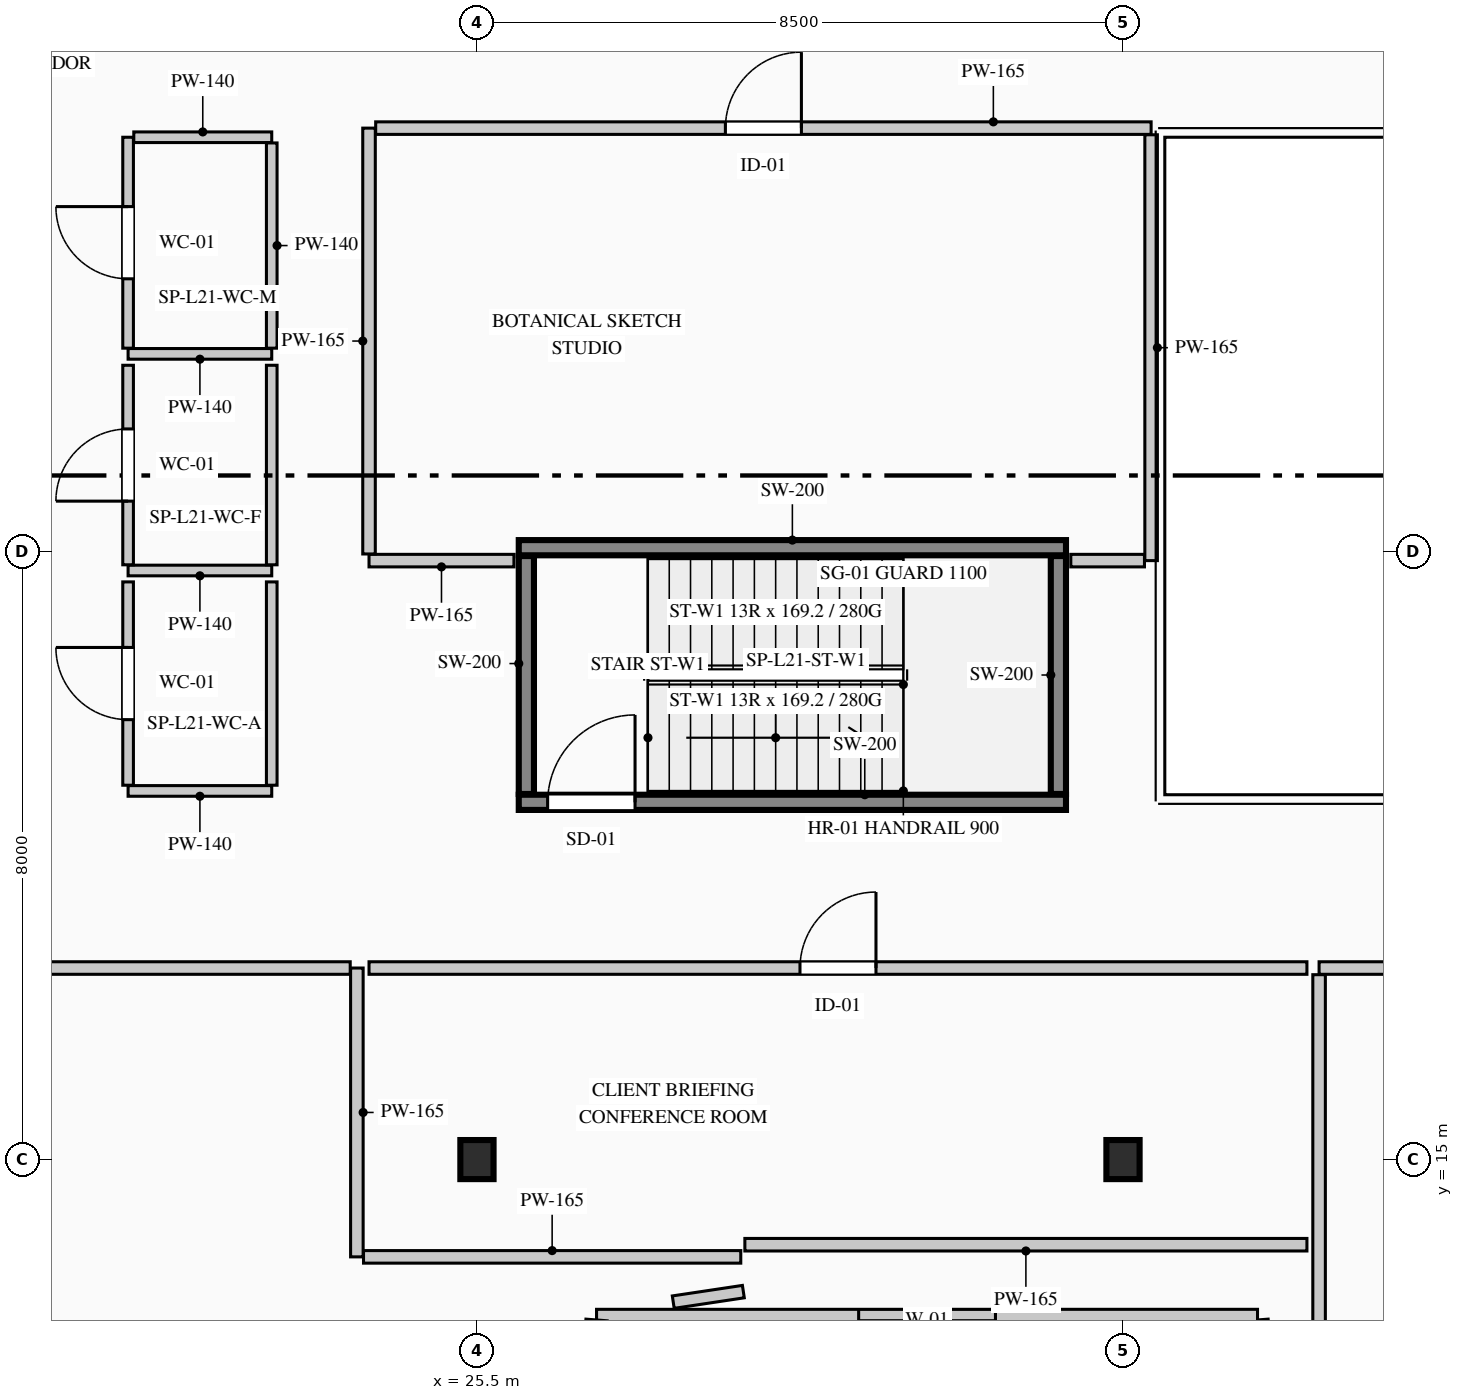
"""IFC4 building model, lengths in metres.
Left out: names, types, materials, properties, quantities, classifications, styles, units other than length and angle.
Written with IfcOpenShell. Run it as: python <this file> out.ifc"""

import sys

from ifc_helpers import new_model, si_unit, direction, frame, frame_2d, origin, origin_2d, place, context, subcontext, project, spatial, rectangle, i_section, extrude, element, fill, save


model = new_model("IFC4")
c1 = context("Model", 3, precision=1e-05, world=origin(), true_north=direction((0.0, 1.0)))
c2 = subcontext(c1, "Body", "Model", "MODEL_VIEW")
j1 = project(units=[si_unit("LENGTHUNIT", "METRE"), si_unit("PLANEANGLEUNIT", "RADIAN")], contexts=[c1])
p1 = place(None, origin())
s1 = spatial("IfcSite", under=j1, at=p1, CompositionType="ELEMENT")
p2 = place(p1, origin())
s2 = spatial("IfcBuilding", under=s1, at=p2, CompositionType="ELEMENT")
p3 = place(p2, frame((0.0, 0.0, 93.0)))
s3 = spatial("IfcBuildingStorey", under=s2, at=p3, CompositionType="ELEMENT", Elevation=93.0)
p4 = place(p3, frame((26.05, 19.7, 0.0), z_axis=(0.0, 0.0, 1.0), x_axis=(1.0, 0.0, 0.0)))
e1 = element("IfcWall", 1, at=p4, inside=s3, PredefinedType="SHEAR", context=c2, shape_type="SweptSolid", body=[
    extrude(rectangle(XDim=7.2, YDim=0.2, at=frame_2d((3.6, 0.0))), origin(), (0.0, 0.0, 1.0), 4.4),
])
p5 = place(p4, frame((0.38, 0.0, 0.0)))
e2 = element("IfcOpeningElement", 2, at=p5, cuts=e1, PredefinedType="OPENING", context=c2, shape_type="SweptSolid", body=[
    extrude(rectangle(XDim=1.15, YDim=2.2, at=frame_2d((0.575, 1.1))), frame((0.0, 0.11, 0.0), z_axis=(0.0, -1.0, 0.0), x_axis=(1.0, 0.0, 0.0)), (0.0, 0.0, 1.0), 0.22),
])
p6 = place(p3, frame((26.05, 23.05, 0.0), z_axis=(0.0, 0.0, 1.0), x_axis=(1.0, 0.0, 0.0)))
e3 = element("IfcWall", 3, at=p6, inside=s3, PredefinedType="SHEAR", context=c2, shape_type="SweptSolid", body=[
    extrude(rectangle(XDim=7.2, YDim=0.2, at=frame_2d((3.6, 0.0))), origin(), (0.0, 0.0, 1.0), 4.4),
])
for number, where, z_axis, x_axis in (
    (4, (26.15, 19.81, 0.0), (0.0, 0.0, 1.0), (0.0, 1.0, 0.0)),
    (5, (33.15, 19.81, 0.0), (0.0, 0.0, 1.0), (0.0, 1.0, 0.0)),
):
    element("IfcWall", number, at=place(p3, frame(where, z_axis=z_axis, x_axis=x_axis)), inside=s3, PredefinedType="SHEAR", context=c2, shape_type="SweptSolid", body=[
        extrude(rectangle(XDim=3.13, YDim=0.2, at=frame_2d((1.565, 0.0))), origin(), (0.0, 0.0, 1.0), 4.4),
    ])
for number, where, z_axis, x_axis in (
    (6, (25.5, 15.0, 0.0), (0.0, 0.0, 1.0), (1.0, 0.0, 0.0)),
    (7, (34.0, 15.0, 0.0), (0.0, 0.0, 1.0), (1.0, 0.0, 0.0)),
):
    element("IfcColumn", number, at=place(p3, frame(where, z_axis=z_axis, x_axis=x_axis)), inside=s3, PredefinedType="COLUMN", context=c2, shape_type="SweptSolid", body=[
        extrude(i_section(OverallWidth=0.437, OverallDepth=0.514, WebThickness=0.061, FlangeThickness=0.077, FilletRadius=0.015, at=origin_2d()), origin(), (0.0, 0.0, 1.0), 4.4),
    ])
p7 = place(p3, frame((36.57, 2.64, 0.0), z_axis=(0.0, 0.0, 1.0), x_axis=(-0.077816860153, 0.996967670627, 0.0)))
e8 = element("IfcWall", 8, at=p7, inside=s3, PredefinedType="STANDARD", context=c2, shape_type="SweptSolid", body=[
    extrude(rectangle(XDim=10.281, YDim=0.28, at=frame_2d((5.141, 0.0))), origin(), (0.0, 0.0, 1.0), 4.115),
])
p8 = place(p7, frame((5.68, 0.0, 0.9)))
e9 = element("IfcOpeningElement", 9, at=p8, cuts=e8, PredefinedType="OPENING", context=c2, shape_type="SweptSolid", body=[
    extrude(rectangle(XDim=1.8, YDim=2.1, at=frame_2d((0.9, 1.05))), frame((0.0, 0.15, 0.0), z_axis=(0.0, -1.0, 0.0), x_axis=(1.0, 0.0, 0.0)), (0.0, 0.0, 1.0), 0.3),
])
p9 = place(p3, frame((35.77, 12.89, 0.0), z_axis=(0.0, 0.0, 1.0), x_axis=(-1.0, 0.0, 0.0)))
e10 = element("IfcWall", 10, at=p9, inside=s3, PredefinedType="STANDARD", context=c2, shape_type="SweptSolid", body=[
    extrude(rectangle(XDim=8.697, YDim=0.28, at=frame_2d((4.348, 0.0))), origin(), (0.0, 0.0, 1.0), 4.115),
])
p10 = place(p9, frame((3.448, 0.0, 0.9)))
e11 = element("IfcOpeningElement", 11, at=p10, cuts=e10, PredefinedType="OPENING", context=c2, shape_type="SweptSolid", body=[
    extrude(rectangle(XDim=1.8, YDim=2.1, at=frame_2d((0.9, 1.05))), frame((0.0, 0.15, 0.0), z_axis=(0.0, -1.0, 0.0), x_axis=(1.0, 0.0, 0.0)), (0.0, 0.0, 1.0), 0.3),
])
p11 = place(p3, frame((27.073, 12.89, 0.0), z_axis=(0.0, 0.0, 1.0), x_axis=(-0.077816860153, -0.996967670627, 0.0)))
e12 = element("IfcWall", 12, at=p11, inside=s3, PredefinedType="STANDARD", context=c2, shape_type="SweptSolid", body=[
    extrude(rectangle(XDim=10.281, YDim=0.28, at=frame_2d((5.141, 0.0))), origin(), (0.0, 0.0, 1.0), 4.115),
])
p12 = place(p11, frame((2.801, 0.0, 0.9)))
e13 = element("IfcOpeningElement", 13, at=p12, cuts=e12, PredefinedType="OPENING", context=c2, shape_type="SweptSolid", body=[
    extrude(rectangle(XDim=1.8, YDim=2.1, at=frame_2d((0.9, 1.05))), frame((0.0, 0.15, 0.0), z_axis=(0.0, -1.0, 0.0), x_axis=(1.0, 0.0, 0.0)), (0.0, 0.0, 1.0), 0.3),
])
p13 = place(p3, frame((22.8, 25.6, 0.0), z_axis=(0.0, 0.0, 1.0), x_axis=(-1.0, 0.0, 0.0)))
e14 = element("IfcWall", 14, at=p13, inside=s3, PredefinedType="PARTITIONING", context=c2, shape_type="SweptSolid", body=[
    extrude(rectangle(XDim=1.89, YDim=0.14, at=frame_2d((0.945, 0.0))), origin(), (0.0, 0.0, 1.0), 4.115),
])
p14 = place(p3, frame((20.91, 25.675, 0.0), z_axis=(0.0, 0.0, 1.0), x_axis=(0.0, 1.0, 0.0)))
e15 = element("IfcWall", 15, at=p14, inside=s3, PredefinedType="PARTITIONING", context=c2, shape_type="SweptSolid", body=[
    extrude(rectangle(XDim=2.775, YDim=0.14, at=frame_2d((1.387, 0.0))), origin(), (0.0, 0.0, 1.0), 4.115),
])
p15 = place(p14, frame((0.913, 0.0, 0.0)))
e16 = element("IfcOpeningElement", 16, at=p15, cuts=e15, PredefinedType="OPENING", context=c2, shape_type="SweptSolid", body=[
    extrude(rectangle(XDim=0.95, YDim=2.15, at=frame_2d((0.475, 1.075))), frame((0.0, 0.08, 0.0), z_axis=(0.0, -1.0, 0.0), x_axis=(1.0, 0.0, 0.0)), (0.0, 0.0, 1.0), 0.16),
])
p16 = place(p3, frame((20.985, 28.45, 0.0), z_axis=(0.0, 0.0, 1.0), x_axis=(1.0, 0.0, 0.0)))
e17 = element("IfcWall", 17, at=p16, inside=s3, PredefinedType="PARTITIONING", context=c2, shape_type="SweptSolid", body=[
    extrude(rectangle(XDim=1.815, YDim=0.14, at=frame_2d((0.907, 0.0))), origin(), (0.0, 0.0, 1.0), 4.115),
])
p17 = place(p3, frame((22.8, 28.375, 0.0), z_axis=(0.0, 0.0, 1.0), x_axis=(0.0, -1.0, 0.0)))
e18 = element("IfcWall", 18, at=p17, inside=s3, PredefinedType="PARTITIONING", context=c2, shape_type="SweptSolid", body=[
    extrude(rectangle(XDim=2.7, YDim=0.14, at=frame_2d((1.35, 0.0))), origin(), (0.0, 0.0, 1.0), 3.7),
])
p18 = place(p3, frame((22.8, 22.75, 0.0), z_axis=(0.0, 0.0, 1.0), x_axis=(-1.0, 0.0, 0.0)))
e19 = element("IfcWall", 19, at=p18, inside=s3, PredefinedType="PARTITIONING", context=c2, shape_type="SweptSolid", body=[
    extrude(rectangle(XDim=1.89, YDim=0.14, at=frame_2d((0.945, 0.0))), origin(), (0.0, 0.0, 1.0), 4.115),
])
p19 = place(p3, frame((20.91, 22.825, 0.0), z_axis=(0.0, 0.0, 1.0), x_axis=(0.0, 1.0, 0.0)))
e20 = element("IfcWall", 20, at=p19, inside=s3, PredefinedType="PARTITIONING", context=c2, shape_type="SweptSolid", body=[
    extrude(rectangle(XDim=2.625, YDim=0.14, at=frame_2d((1.312, 0.0))), origin(), (0.0, 0.0, 1.0), 4.115),
])
p20 = place(p19, frame((0.837, 0.0, 0.0)))
e21 = element("IfcOpeningElement", 21, at=p20, cuts=e20, PredefinedType="OPENING", context=c2, shape_type="SweptSolid", body=[
    extrude(rectangle(XDim=0.95, YDim=2.15, at=frame_2d((0.475, 1.075))), frame((0.0, 0.08, 0.0), z_axis=(0.0, -1.0, 0.0), x_axis=(1.0, 0.0, 0.0)), (0.0, 0.0, 1.0), 0.16),
])
p21 = place(p3, frame((22.8, 25.45, 0.0), z_axis=(0.0, 0.0, 1.0), x_axis=(0.0, -1.0, 0.0)))
e22 = element("IfcWall", 22, at=p21, inside=s3, PredefinedType="PARTITIONING", context=c2, shape_type="SweptSolid", body=[
    extrude(rectangle(XDim=2.625, YDim=0.14, at=frame_2d((1.312, 0.0))), origin(), (0.0, 0.0, 1.0), 3.7),
])
p22 = place(p3, frame((22.8, 19.85, 0.0), z_axis=(0.0, 0.0, 1.0), x_axis=(-1.0, 0.0, 0.0)))
e23 = element("IfcWall", 23, at=p22, inside=s3, PredefinedType="PARTITIONING", context=c2, shape_type="SweptSolid", body=[
    extrude(rectangle(XDim=1.89, YDim=0.14, at=frame_2d((0.945, 0.0))), origin(), (0.0, 0.0, 1.0), 4.115),
])
p23 = place(p3, frame((20.91, 19.925, 0.0), z_axis=(0.0, 0.0, 1.0), x_axis=(0.0, 1.0, 0.0)))
e24 = element("IfcWall", 24, at=p23, inside=s3, PredefinedType="PARTITIONING", context=c2, shape_type="SweptSolid", body=[
    extrude(rectangle(XDim=2.675, YDim=0.14, at=frame_2d((1.337, 0.0))), origin(), (0.0, 0.0, 1.0), 4.115),
])
p24 = place(p23, frame((0.863, 0.0, 0.0)))
e25 = element("IfcOpeningElement", 25, at=p24, cuts=e24, PredefinedType="OPENING", context=c2, shape_type="SweptSolid", body=[
    extrude(rectangle(XDim=0.95, YDim=2.15, at=frame_2d((0.475, 1.075))), frame((0.0, 0.08, 0.0), z_axis=(0.0, -1.0, 0.0), x_axis=(1.0, 0.0, 0.0)), (0.0, 0.0, 1.0), 0.16),
])
p25 = place(p3, frame((22.8, 22.6, 0.0), z_axis=(0.0, 0.0, 1.0), x_axis=(0.0, -1.0, 0.0)))
e26 = element("IfcWall", 26, at=p25, inside=s3, PredefinedType="PARTITIONING", context=c2, shape_type="SweptSolid", body=[
    extrude(rectangle(XDim=2.675, YDim=0.14, at=frame_2d((1.337, 0.0))), origin(), (0.0, 0.0, 1.0), 3.7),
])
p26 = place(p3, frame((23.92, 17.52, 0.0), z_axis=(0.0, 0.0, 1.0), x_axis=(0.0, -1.0, 0.0)))
e27 = element("IfcWall", 27, at=p26, inside=s3, PredefinedType="PARTITIONING", context=c2, shape_type="SweptSolid", body=[
    extrude(rectangle(XDim=3.8, YDim=0.165, at=frame_2d((1.9, 0.0))), origin(), (0.0, 0.0, 1.0), 3.7),
])
p27 = place(p3, frame((24.008, 13.72, 0.0), z_axis=(0.0, 0.0, 1.0), x_axis=(1.0, 0.0, 0.0)))
e28 = element("IfcWall", 28, at=p27, inside=s3, PredefinedType="PARTITIONING", context=c2, shape_type="SweptSolid", body=[
    extrude(rectangle(XDim=4.963, YDim=0.165, at=frame_2d((2.482, 0.0))), origin(), (0.0, 0.0, 1.0), 4.115),
])
p28 = place(p3, frame((29.005, 13.263, 0.0), z_axis=(0.0, 0.0, 1.0), x_axis=(-0.988919061759, -0.148455681233, 0.0)))
e29 = element("IfcWall", 29, at=p28, inside=s3, PredefinedType="PARTITIONING", context=c2, shape_type="SweptSolid", body=[
    extrude(rectangle(XDim=0.932, YDim=0.165, at=frame_2d((0.466, 0.0))), origin(), (0.0, 0.0, 1.0), 4.115),
])
p29 = place(p3, frame((12.367, 17.52, 0.0), z_axis=(0.0, 0.0, 1.0), x_axis=(1.0, 0.0, 0.0)))
e30 = element("IfcWall", 30, at=p29, inside=s3, PredefinedType="PARTITIONING", context=c2, shape_type="SweptSolid", body=[
    extrude(rectangle(XDim=11.465, YDim=0.165, at=frame_2d((5.732, 0.0))), origin(), (0.0, 0.0, 1.0), 4.115),
])
p30 = place(p29, frame((5.232, 0.0, 0.0)))
e31 = element("IfcOpeningElement", 31, at=p30, cuts=e30, PredefinedType="OPENING", context=c2, shape_type="SweptSolid", body=[
    extrude(rectangle(XDim=1.0, YDim=2.15, at=frame_2d((0.5, 1.075))), frame((0.0, 0.093, 0.0), z_axis=(0.0, -1.0, 0.0), x_axis=(1.0, 0.0, 0.0)), (0.0, 0.0, 1.0), 0.185),
])
p31 = place(p3, frame((36.58, 17.52, 0.0), z_axis=(0.0, 0.0, 1.0), x_axis=(1.0, 0.0, 0.0)))
e32 = element("IfcWall", 32, at=p31, inside=s3, PredefinedType="PARTITIONING", context=c2, shape_type="SweptSolid", body=[
    extrude(rectangle(XDim=8.4, YDim=0.165, at=frame_2d((4.2, 0.0))), origin(), (0.0, 0.0, 1.0), 4.115),
])
p32 = place(p31, frame((3.7, 0.0, 0.0)))
e33 = element("IfcOpeningElement", 33, at=p32, cuts=e32, PredefinedType="OPENING", context=c2, shape_type="SweptSolid", body=[
    extrude(rectangle(XDim=1.0, YDim=2.15, at=frame_2d((0.5, 1.075))), frame((0.0, 0.093, 0.0), z_axis=(0.0, -1.0, 0.0), x_axis=(1.0, 0.0, 0.0)), (0.0, 0.0, 1.0), 0.185),
])
p33 = place(p3, frame((36.58, 5.525, 0.0), z_axis=(0.0, 0.0, 1.0), x_axis=(0.0, 1.0, 0.0)))
e34 = element("IfcWall", 34, at=p33, inside=s3, PredefinedType="PARTITIONING", context=c2, shape_type="SweptSolid", body=[
    extrude(rectangle(XDim=11.907, YDim=0.165, at=frame_2d((5.954, 0.0))), origin(), (0.0, 0.0, 1.0), 4.115),
])
p34 = place(p3, frame((24.08, 17.52, 0.0), z_axis=(0.0, 0.0, 1.0), x_axis=(1.0, 0.0, 0.0)))
e35 = element("IfcWall", 35, at=p34, inside=s3, PredefinedType="PARTITIONING", context=c2, shape_type="SweptSolid", body=[
    extrude(rectangle(XDim=12.34, YDim=0.165, at=frame_2d((6.17, 0.0))), origin(), (0.0, 0.0, 1.0), 3.7),
])
p35 = place(p34, frame((5.67, 0.0, 0.0)))
e36 = element("IfcOpeningElement", 36, at=p35, cuts=e35, PredefinedType="OPENING", context=c2, shape_type="SweptSolid", body=[
    extrude(rectangle(XDim=1.0, YDim=2.15, at=frame_2d((0.5, 1.075))), frame((0.0, 0.093, 0.0), z_axis=(0.0, -1.0, 0.0), x_axis=(1.0, 0.0, 0.0)), (0.0, 0.0, 1.0), 0.185),
])
p36 = place(p3, frame((36.42, 13.88, 0.0), z_axis=(0.0, 0.0, 1.0), x_axis=(-1.0, 0.0, 0.0)))
e37 = element("IfcWall", 37, at=p36, inside=s3, PredefinedType="PARTITIONING", context=c2, shape_type="SweptSolid", body=[
    extrude(rectangle(XDim=7.395, YDim=0.165, at=frame_2d((3.698, 0.0))), origin(), (0.0, 0.0, 1.0), 4.115),
])
p37 = place(p3, frame((25.987, 22.88, 0.0), z_axis=(0.0, 0.0, 1.0), x_axis=(-1.0, 0.0, 0.0)))
e38 = element("IfcWall", 38, at=p37, inside=s3, PredefinedType="PARTITIONING", context=c2, shape_type="SweptSolid", body=[
    extrude(rectangle(XDim=1.907, YDim=0.165, at=frame_2d((0.953, 0.0))), origin(), (0.0, 0.0, 1.0), 4.115),
])
p38 = place(p3, frame((24.08, 22.968, 0.0), z_axis=(0.0, 0.0, 1.0), x_axis=(0.0, 1.0, 0.0)))
e39 = element("IfcWall", 39, at=p38, inside=s3, PredefinedType="PARTITIONING", context=c2, shape_type="SweptSolid", body=[
    extrude(rectangle(XDim=5.603, YDim=0.165, at=frame_2d((2.801, 0.0))), origin(), (0.0, 0.0, 1.0), 4.115),
])
p39 = place(p3, frame((24.167, 28.57, 0.0), z_axis=(0.0, 0.0, 1.0), x_axis=(1.0, 0.0, 0.0)))
e40 = element("IfcWall", 40, at=p39, inside=s3, PredefinedType="PARTITIONING", context=c2, shape_type="SweptSolid", body=[
    extrude(rectangle(XDim=10.203, YDim=0.165, at=frame_2d((5.101, 0.0))), origin(), (0.0, 0.0, 1.0), 3.7),
])
p40 = place(p39, frame((4.601, 0.0, 0.0)))
e41 = element("IfcOpeningElement", 41, at=p40, cuts=e40, PredefinedType="OPENING", context=c2, shape_type="SweptSolid", body=[
    extrude(rectangle(XDim=1.0, YDim=2.15, at=frame_2d((0.5, 1.075))), frame((0.0, 0.093, 0.0), z_axis=(0.0, -1.0, 0.0), x_axis=(1.0, 0.0, 0.0)), (0.0, 0.0, 1.0), 0.185),
])
p41 = place(p3, frame((34.37, 28.482, 0.0), z_axis=(0.0, 0.0, 1.0), x_axis=(0.0, -1.0, 0.0)))
e42 = element("IfcWall", 42, at=p41, inside=s3, PredefinedType="PARTITIONING", context=c2, shape_type="SweptSolid", body=[
    extrude(rectangle(XDim=5.603, YDim=0.165, at=frame_2d((2.801, 0.0))), origin(), (0.0, 0.0, 1.0), 4.115),
])
p42 = place(p3, frame((34.282, 22.88, 0.0), z_axis=(0.0, 0.0, 1.0), x_axis=(-1.0, 0.0, 0.0)))
e43 = element("IfcWall", 43, at=p42, inside=s3, PredefinedType="PARTITIONING", context=c2, shape_type="SweptSolid", body=[
    extrude(rectangle(XDim=0.969, YDim=0.165, at=frame_2d((0.485, 0.0))), origin(), (0.0, 0.0, 1.0), 4.115),
])
p43 = place(p10, origin())
e44 = element("IfcWindow", 44, at=p43, inside=s3, PartitioningType="SINGLE_PANEL", PredefinedType="WINDOW", context=c2, shape_type="SweptSolid", body=[
    extrude(rectangle(XDim=1.8, YDim=2.1, at=frame_2d((0.9, 1.05))), frame((0.0, 0.03, 0.0), z_axis=(0.0, -1.0, 0.0), x_axis=(1.0, 0.0, 0.0)), (0.0, 0.0, 1.0), 0.06),
])
fill(e11, e44)
p44 = place(p5, origin())
e45 = element("IfcDoor", 45, at=p44, inside=s3, OperationType="SINGLE_SWING_RIGHT", PredefinedType="DOOR", context=c2, shape_type="SweptSolid", body=[
    extrude(rectangle(XDim=1.15, YDim=2.2, at=frame_2d((0.575, 1.1))), frame((0.0, 0.025, 0.0), z_axis=(0.0, -1.0, 0.0), x_axis=(1.0, 0.0, 0.0)), (0.0, 0.0, 1.0), 0.05),
])
fill(e2, e45)
p45 = place(p15, origin())
e46 = element("IfcDoor", 46, at=p45, inside=s3, OperationType="SINGLE_SWING_RIGHT", PredefinedType="DOOR", context=c2, shape_type="SweptSolid", body=[
    extrude(rectangle(XDim=0.95, YDim=2.15, at=frame_2d((0.475, 1.075))), frame((0.0, 0.025, 0.0), z_axis=(0.0, -1.0, 0.0), x_axis=(1.0, 0.0, 0.0)), (0.0, 0.0, 1.0), 0.05),
])
fill(e16, e46)
p46 = place(p20, origin())
e47 = element("IfcDoor", 47, at=p46, inside=s3, OperationType="SINGLE_SWING_LEFT", PredefinedType="DOOR", context=c2, shape_type="SweptSolid", body=[
    extrude(rectangle(XDim=0.95, YDim=2.15, at=frame_2d((0.475, 1.075))), frame((0.0, 0.025, 0.0), z_axis=(0.0, -1.0, 0.0), x_axis=(1.0, 0.0, 0.0)), (0.0, 0.0, 1.0), 0.05),
])
fill(e21, e47)
p47 = place(p24, origin())
e48 = element("IfcDoor", 48, at=p47, inside=s3, OperationType="SINGLE_SWING_RIGHT", PredefinedType="DOOR", context=c2, shape_type="SweptSolid", body=[
    extrude(rectangle(XDim=0.95, YDim=2.15, at=frame_2d((0.475, 1.075))), frame((0.0, 0.025, 0.0), z_axis=(0.0, -1.0, 0.0), x_axis=(1.0, 0.0, 0.0)), (0.0, 0.0, 1.0), 0.05),
])
fill(e25, e48)
p48 = place(p35, origin())
e49 = element("IfcDoor", 49, at=p48, inside=s3, OperationType="SINGLE_SWING_RIGHT", PredefinedType="DOOR", context=c2, shape_type="SweptSolid", body=[
    extrude(rectangle(XDim=1.0, YDim=2.15, at=frame_2d((0.5, 1.075))), frame((0.0, 0.025, 0.0), z_axis=(0.0, -1.0, 0.0), x_axis=(1.0, 0.0, 0.0)), (0.0, 0.0, 1.0), 0.05),
])
fill(e36, e49)
p49 = place(p40, origin())
e50 = element("IfcDoor", 50, at=p49, inside=s3, OperationType="SINGLE_SWING_RIGHT", PredefinedType="DOOR", context=c2, shape_type="SweptSolid", body=[
    extrude(rectangle(XDim=1.0, YDim=2.15, at=frame_2d((0.5, 1.075))), frame((0.0, 0.025, 0.0), z_axis=(0.0, -1.0, 0.0), x_axis=(1.0, 0.0, 0.0)), (0.0, 0.0, 1.0), 0.05),
])
fill(e41, e50)
save(model, sys.argv[1])
